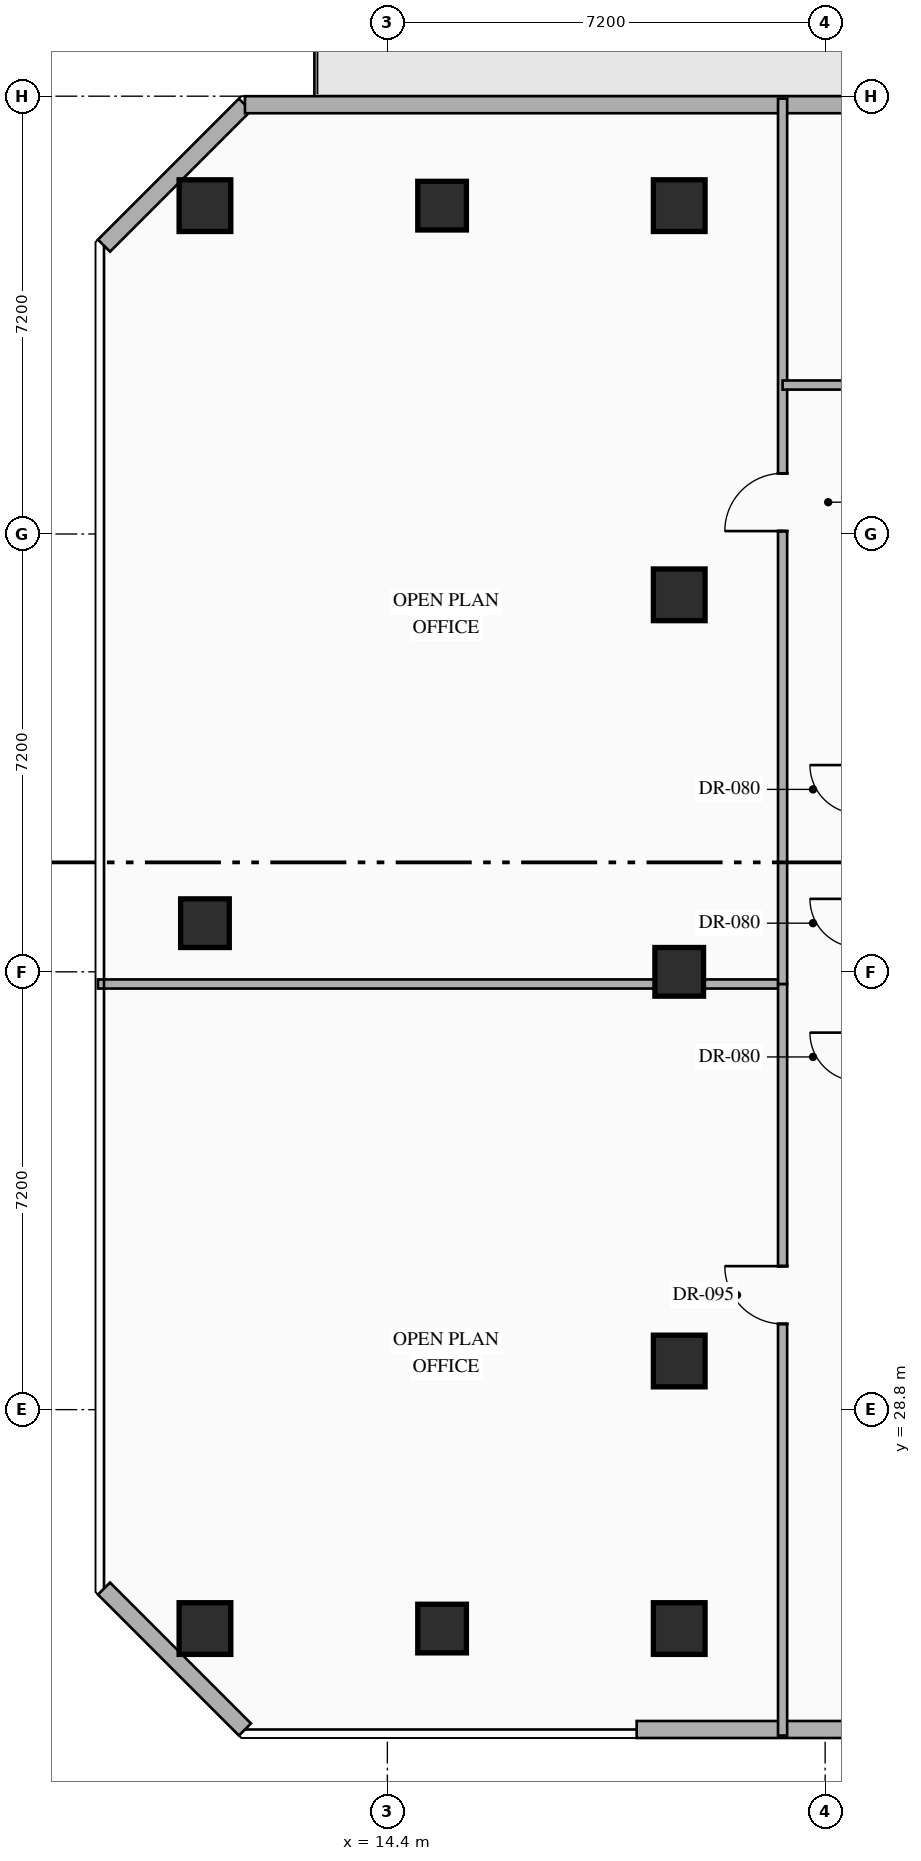
"""IFC4 building model, lengths in metres.
Left out: names, types, materials, properties, quantities, classifications, styles, units other than length and angle.
Written with IfcOpenShell. Run it as: python <this file> out.ifc"""

import sys

from ifc_helpers import new_model, si_unit, direction, frame, frame_2d, origin, origin_2d, place, context, subcontext, project, spatial, rectangle, hollow_rectangle, extrude, element, fill, save


model = new_model("IFC4")
c1 = context("Model", 3, precision=1e-05, world=origin(), true_north=direction((0.0, 1.0)))
c2 = subcontext(c1, "Body", "Model", "MODEL_VIEW")
j1 = project(units=[si_unit("LENGTHUNIT", "METRE"), si_unit("PLANEANGLEUNIT", "RADIAN")], contexts=[c1])
p1 = place(None, origin())
s1 = spatial("IfcSite", under=j1, at=p1, CompositionType="ELEMENT")
p2 = place(p1, origin())
s2 = spatial("IfcBuilding", under=s1, at=p2, CompositionType="ELEMENT")
p3 = place(p2, frame((0.0, 0.0, 156.45)))
s3 = spatial("IfcBuildingStorey", under=s2, at=p3, CompositionType="ELEMENT", Elevation=156.45)
for number, where, z_axis, x_axis in (
    (1, (11.4, 25.2, 0.0), (0.0, 0.0, 1.0), (1.0, 0.0, 0.0)),
    (2, (11.4, 48.6, 0.0), (0.0, 0.0, 1.0), (1.0, 0.0, 0.0)),
    (3, (19.2, 48.6, 0.0), (0.0, 0.0, 1.0), (1.0, 0.0, 0.0)),
    (4, (19.2, 25.2, 0.0), (0.0, 0.0, 1.0), (1.0, 0.0, 0.0)),
    (5, (19.2, 29.6, 0.0), (0.0, 0.0, 1.0), (1.0, 0.0, 0.0)),
    (6, (19.2, 42.2, 0.0), (0.0, 0.0, 1.0), (1.0, 0.0, 0.0)),
):
    element("IfcColumn", number, at=place(p3, frame(where, z_axis=z_axis, x_axis=x_axis)), inside=s3, PredefinedType="COLUMN", context=c2, shape_type="SweptSolid", body=[
        extrude(hollow_rectangle(XDim=0.85, YDim=0.85, WallThickness=0.032, at=origin_2d()), origin(), (0.0, 0.0, 1.0), 3.6),
    ])
for number, where, z_axis, x_axis in (
    (7, (11.4, 36.8, 0.0), (0.0, 0.0, 1.0), (1.0, 0.0, 0.0)),
    (8, (19.2, 36.0, 0.0), (0.0, 0.0, 1.0), (1.0, 0.0, 0.0)),
    (9, (15.3, 25.2, 0.0), (0.0, 0.0, 1.0), (1.0, 0.0, 0.0)),
    (10, (15.3, 48.6, 0.0), (0.0, 0.0, 1.0), (1.0, 0.0, 0.0)),
):
    element("IfcColumn", number, at=place(p3, frame(where, z_axis=z_axis, x_axis=x_axis)), inside=s3, PredefinedType="COLUMN", context=c2, shape_type="SweptSolid", body=[
        extrude(hollow_rectangle(XDim=0.8, YDim=0.8, WallThickness=0.032, at=origin_2d()), origin(), (0.0, 0.0, 1.0), 3.6),
    ])
p4 = place(p3, frame((25.247, 23.54, 0.0), z_axis=(0.0, 0.0, 1.0), x_axis=(-1.0, 0.0, 0.0)))
e11 = element("IfcWall", 11, at=p4, inside=s3, PredefinedType="STANDARD", context=c2, shape_type="SweptSolid", body=[
    extrude(rectangle(XDim=6.747, YDim=0.28, at=frame_2d((3.374, 0.0))), origin(), (0.0, 0.0, 1.0), 3.35),
])
p5 = place(p3, frame((12.058, 23.54, 0.0), z_axis=(0.0, 0.0, 1.0), x_axis=(-0.707144017911, 0.707069542501, 0.0)))
e12 = element("IfcWall", 12, at=p5, inside=s3, PredefinedType="STANDARD", context=c2, shape_type="SweptSolid", body=[
    extrude(rectangle(XDim=3.278, YDim=0.28, at=frame_2d((1.639, 0.0))), origin(), (0.0, 0.0, 1.0), 3.35),
])
p6 = place(p3, frame((9.74, 47.942, 0.0), z_axis=(0.0, 0.0, 1.0), x_axis=(0.707106781187, 0.707106781187, 0.0)))
e13 = element("IfcWall", 13, at=p6, inside=s3, PredefinedType="STANDARD", context=c2, shape_type="SweptSolid", body=[
    extrude(rectangle(XDim=3.278, YDim=0.28, at=frame_2d((1.639, 0.0))), origin(), (0.0, 0.0, 1.0), 3.35),
])
p7 = place(p3, frame((12.058, 50.26, 0.0), z_axis=(0.0, 0.0, 1.0), x_axis=(1.0, 0.0, 0.0)))
e14 = element("IfcWall", 14, at=p7, inside=s3, PredefinedType="STANDARD", context=c2, shape_type="SweptSolid", body=[
    extrude(rectangle(XDim=30.484, YDim=0.28, at=frame_2d((15.242, 0.0))), origin(), (0.0, 0.0, 1.0), 3.35),
])
p8 = place(p7, frame((14.992, 0.0, 0.0)))
e15 = element("IfcOpeningElement", 15, at=p8, cuts=e14, PredefinedType="OPENING", context=c2, shape_type="SweptSolid", body=[
    extrude(rectangle(XDim=1.1, YDim=2.2, at=frame_2d((0.55, 1.1))), frame((0.0, 0.15, 0.0), z_axis=(0.0, -1.0, 0.0), x_axis=(1.0, 0.0, 0.0)), (0.0, 0.0, 1.0), 0.3),
])
p9 = place(p7, frame((10.074, 0.0, 0.85)))
e16 = element("IfcOpeningElement", 16, at=p9, cuts=e14, PredefinedType="OPENING", context=c2, shape_type="SweptSolid", body=[
    extrude(rectangle(XDim=1.8, YDim=2.1, at=frame_2d((0.9, 1.05))), frame((0.0, 0.15, 0.0), z_axis=(0.0, -1.0, 0.0), x_axis=(1.0, 0.0, 0.0)), (0.0, 0.0, 1.0), 0.3),
])
p10 = place(p3, frame((9.64, 35.8, 0.0), z_axis=(0.0, 0.0, 1.0), x_axis=(1.0, 0.0, 0.0)))
e17 = element("IfcWall", 17, at=p10, inside=s3, PredefinedType="PARTITIONING", context=c2, shape_type="SweptSolid", body=[
    extrude(rectangle(XDim=11.26, YDim=0.15, at=frame_2d((5.63, 0.0))), origin(), (0.0, 0.0, 1.0), 2.695),
])
p11 = place(p3, frame((20.9, 23.44, 0.0), z_axis=(0.0, 0.0, 1.0), x_axis=(0.0, 1.0, 0.0)))
e18 = element("IfcWall", 18, at=p11, inside=s3, PredefinedType="PARTITIONING", context=c2, shape_type="SweptSolid", body=[
    extrude(rectangle(XDim=12.36, YDim=0.15, at=frame_2d((6.18, 0.0))), origin(), (0.0, 0.0, 1.0), 3.35),
])
p12 = place(p11, frame((6.77, 0.0, 0.0)))
e19 = element("IfcOpeningElement", 19, at=p12, cuts=e18, PredefinedType="OPENING", context=c2, shape_type="SweptSolid", body=[
    extrude(rectangle(XDim=0.95, YDim=2.15, at=frame_2d((0.475, 1.075))), frame((0.0, 0.085, 0.0), z_axis=(0.0, -1.0, 0.0), x_axis=(1.0, 0.0, 0.0)), (0.0, 0.0, 1.0), 0.17),
])
p13 = place(p3, frame((20.9, 35.8, 0.0), z_axis=(0.0, 0.0, 1.0), x_axis=(0.0, 1.0, 0.0)))
e20 = element("IfcWall", 20, at=p13, inside=s3, PredefinedType="PARTITIONING", context=c2, shape_type="SweptSolid", body=[
    extrude(rectangle(XDim=14.56, YDim=0.15, at=frame_2d((7.28, 0.0))), origin(), (0.0, 0.0, 1.0), 3.35),
])
p14 = place(p13, frame((7.448, 0.0, 0.0)))
e21 = element("IfcOpeningElement", 21, at=p14, cuts=e20, PredefinedType="OPENING", context=c2, shape_type="SweptSolid", body=[
    extrude(rectangle(XDim=0.95, YDim=2.15, at=frame_2d((0.475, 1.075))), frame((0.0, 0.085, 0.0), z_axis=(0.0, -1.0, 0.0), x_axis=(1.0, 0.0, 0.0)), (0.0, 0.0, 1.0), 0.17),
])
p15 = place(p3, frame((20.9, 45.65, 0.0), z_axis=(0.0, 0.0, 1.0), x_axis=(1.0, 0.0, 0.0)))
e22 = element("IfcWall", 22, at=p15, inside=s3, PredefinedType="PARTITIONING", context=c2, shape_type="SweptSolid", body=[
    extrude(rectangle(XDim=11.9, YDim=0.15, at=frame_2d((5.95, 0.0))), origin(), (0.0, 0.0, 1.0), 2.695),
])
p16 = place(p15, frame((6.494, 0.0, 0.0)))
e23 = element("IfcOpeningElement", 23, at=p16, cuts=e22, PredefinedType="OPENING", context=c2, shape_type="SweptSolid", body=[
    extrude(rectangle(XDim=0.95, YDim=2.15, at=frame_2d((0.475, 1.075))), frame((0.0, 0.085, 0.0), z_axis=(0.0, -1.0, 0.0), x_axis=(1.0, 0.0, 0.0)), (0.0, 0.0, 1.0), 0.17),
])
p17 = place(p12, origin())
e24 = element("IfcDoor", 24, at=p17, inside=s3, OperationType="SINGLE_SWING_RIGHT", PredefinedType="DOOR", context=c2, shape_type="SweptSolid", body=[
    extrude(rectangle(XDim=0.95, YDim=2.15, at=frame_2d((0.475, 1.075))), frame((0.0, 0.025, 0.0), z_axis=(0.0, -1.0, 0.0), x_axis=(1.0, 0.0, 0.0)), (0.0, 0.0, 1.0), 0.05),
])
fill(e19, e24)
p18 = place(p14, origin())
e25 = element("IfcDoor", 25, at=p18, inside=s3, OperationType="SINGLE_SWING_LEFT", PredefinedType="DOOR", context=c2, shape_type="SweptSolid", body=[
    extrude(rectangle(XDim=0.95, YDim=2.15, at=frame_2d((0.475, 1.075))), frame((0.0, 0.025, 0.0), z_axis=(0.0, -1.0, 0.0), x_axis=(1.0, 0.0, 0.0)), (0.0, 0.0, 1.0), 0.05),
])
fill(e21, e25)
save(model, sys.argv[1])
